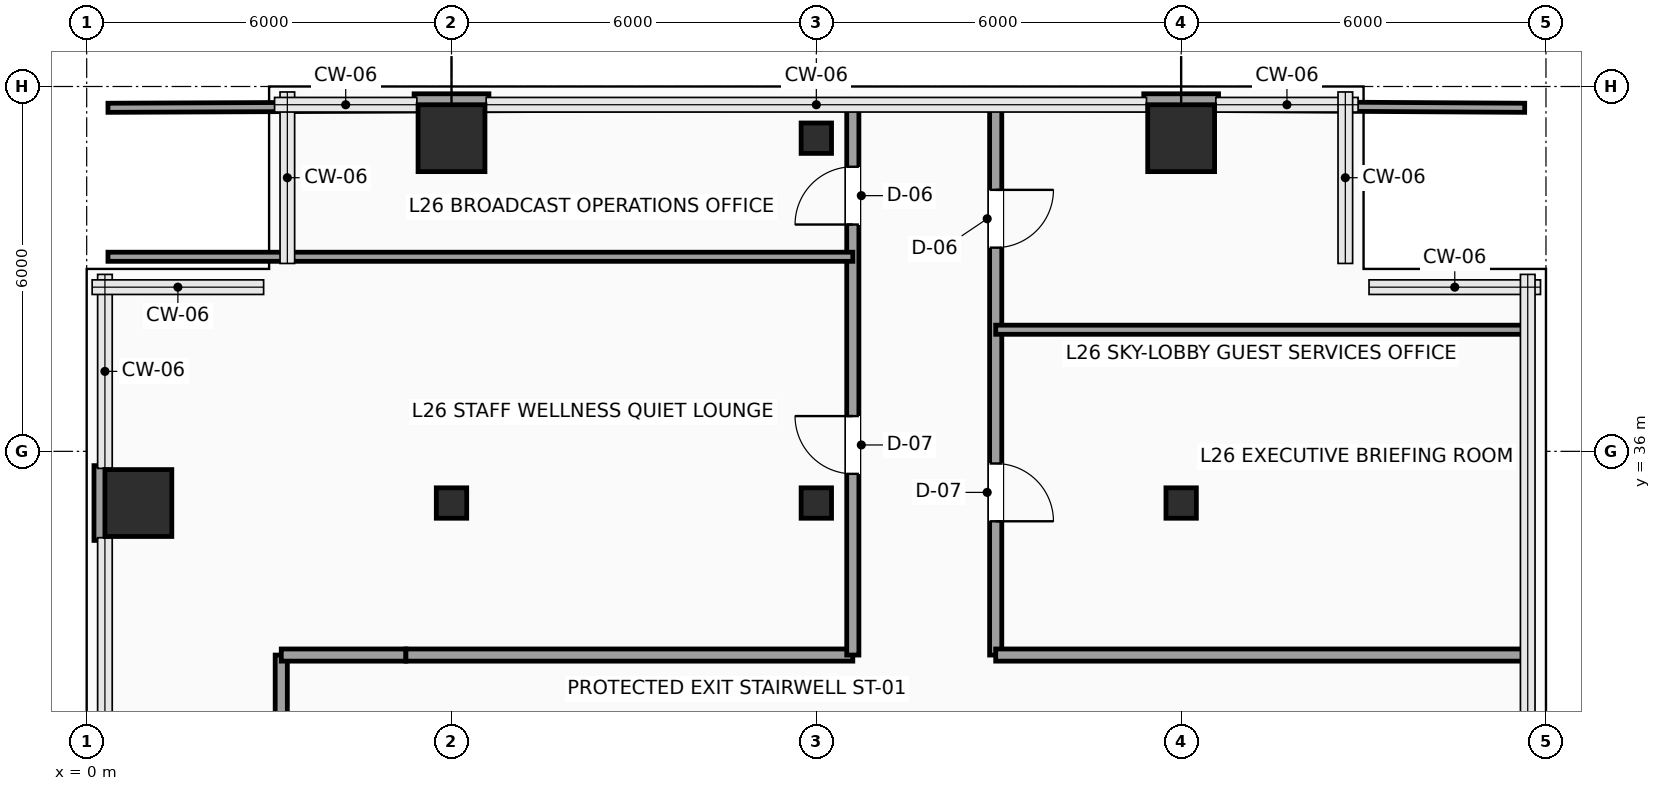
"""IFC4 building model, lengths in metres.
Left out: names, types, materials, properties, quantities, classifications, styles, units other than length and angle.
Written with IfcOpenShell. Run it as: python <this file> out.ifc"""

import sys

from ifc_helpers import new_model, si_unit, direction, frame, frame_2d, origin, origin_2d, place, context, subcontext, project, spatial, rectangle, hollow_rectangle, extrude, element, fill, save


model = new_model("IFC4")
c1 = context("Model", 3, precision=1e-05, world=origin(), true_north=direction((0.0, 1.0)))
c2 = subcontext(c1, "Body", "Model", "MODEL_VIEW")
j1 = project(units=[si_unit("LENGTHUNIT", "METRE"), si_unit("PLANEANGLEUNIT", "RADIAN")], contexts=[c1])
p1 = place(None, origin())
s1 = spatial("IfcSite", under=j1, at=p1, CompositionType="ELEMENT")
p2 = place(p1, origin())
s2 = spatial("IfcBuilding", under=s1, at=p2, CompositionType="ELEMENT")
p3 = place(p2, frame((0.0, 0.0, 110.85)))
s3 = spatial("IfcBuildingStorey", under=s2, at=p3, CompositionType="ELEMENT", Elevation=110.85)
p4 = place(p3, frame((0.85, 35.15, 0.0), z_axis=(0.0, 0.0, 1.0), x_axis=(1.0, 0.0, 0.0)))
e1 = element("IfcColumn", 1, at=p4, inside=s3, PredefinedType="COLUMN", context=c2, shape_type="SweptSolid", body=[
    extrude(rectangle(XDim=1.1, YDim=1.1, at=origin_2d()), origin(), (0.0, 0.0, 1.0), 4.8),
])
p5 = place(p3, frame((6.0, 35.15, 0.0), z_axis=(0.0, 0.0, 1.0), x_axis=(1.0, 0.0, 0.0)))
e2 = element("IfcColumn", 2, at=p5, inside=s3, PredefinedType="COLUMN", context=c2, shape_type="SweptSolid", body=[
    extrude(hollow_rectangle(XDim=0.5, YDim=0.5, WallThickness=0.025, InnerFilletRadius=0.025, OuterFilletRadius=0.04, at=origin_2d()), origin(), (0.0, 0.0, 1.0), 4.8),
])
p6 = place(p3, frame((6.0, 41.15, 0.0), z_axis=(0.0, 0.0, 1.0), x_axis=(1.0, 0.0, 0.0)))
e3 = element("IfcColumn", 3, at=p6, inside=s3, PredefinedType="COLUMN", context=c2, shape_type="SweptSolid", body=[
    extrude(rectangle(XDim=1.1, YDim=1.1, at=origin_2d()), origin(), (0.0, 0.0, 1.0), 4.8),
])
for number, where, z_axis, x_axis in (
    (4, (12.0, 35.15, 0.0), (0.0, 0.0, 1.0), (1.0, 0.0, 0.0)),
    (5, (12.0, 41.15, 0.0), (0.0, 0.0, 1.0), (1.0, 0.0, 0.0)),
    (6, (18.0, 35.15, 0.0), (0.0, 0.0, 1.0), (1.0, 0.0, 0.0)),
):
    element("IfcColumn", number, at=place(p3, frame(where, z_axis=z_axis, x_axis=x_axis)), inside=s3, PredefinedType="COLUMN", context=c2, shape_type="SweptSolid", body=[
        extrude(hollow_rectangle(XDim=0.5, YDim=0.5, WallThickness=0.025, InnerFilletRadius=0.025, OuterFilletRadius=0.04, at=origin_2d()), origin(), (0.0, 0.0, 1.0), 4.8),
    ])
p7 = place(p3, frame((18.0, 41.15, 0.0), z_axis=(0.0, 0.0, 1.0), x_axis=(1.0, 0.0, 0.0)))
e7 = element("IfcColumn", 7, at=p7, inside=s3, PredefinedType="COLUMN", context=c2, shape_type="SweptSolid", body=[
    extrude(rectangle(XDim=1.1, YDim=1.1, at=origin_2d()), origin(), (0.0, 0.0, 1.0), 4.8),
])
for number, where, z_axis, x_axis in (
    (8, (0.24, 34.535, 0.0), (0.0, 0.0, 1.0), (0.0, 1.0, 0.0)),
    (9, (5.385, 41.76, 0.0), (0.0, 0.0, 1.0), (1.0, 0.0, 0.0)),
    (10, (17.385, 41.76, 0.0), (0.0, 0.0, 1.0), (1.0, 0.0, 0.0)),
):
    element("IfcWall", number, at=place(p3, frame(where, z_axis=z_axis, x_axis=x_axis)), inside=s3, PredefinedType="SOLIDWALL", context=c2, shape_type="SweptSolid", body=[
        extrude(rectangle(XDim=1.23, YDim=0.24, at=frame_2d((0.615, 0.0))), origin(), (0.0, 0.0, 1.0), 4.575),
    ])
p8 = place(p3, frame((3.2, 30.25, 0.0), z_axis=(0.0, 0.0, 1.0), x_axis=(0.0, 1.0, 0.0)))
e11 = element("IfcWall", 11, at=p8, inside=s3, PredefinedType="PARTITIONING", context=c2, shape_type="SweptSolid", body=[
    extrude(rectangle(XDim=2.4, YDim=0.2, at=frame_2d((1.2, 0.0))), origin(), (0.0, 0.0, 1.0), 4.575),
])
p9 = place(p3, frame((3.2, 32.65, 0.0), z_axis=(0.0, 0.0, 1.0), x_axis=(1.0, 0.0, 0.0)))
e12 = element("IfcWall", 12, at=p9, inside=s3, PredefinedType="PARTITIONING", context=c2, shape_type="SweptSolid", body=[
    extrude(rectangle(XDim=2.05, YDim=0.2, at=frame_2d((1.025, 0.0))), origin(), (0.0, 0.0, 1.0), 4.575),
])
p10 = place(p3, frame((5.25, 32.65, 0.0), z_axis=(0.0, 0.0, 1.0), x_axis=(1.0, 0.0, 0.0)))
e13 = element("IfcWall", 13, at=p10, inside=s3, PredefinedType="PARTITIONING", context=c2, shape_type="SweptSolid", body=[
    extrude(rectangle(XDim=7.35, YDim=0.2, at=frame_2d((3.675, 0.0))), origin(), (0.0, 0.0, 1.0), 4.575),
])
p11 = place(p3, frame((12.6, 32.65, 0.0), z_axis=(0.0, 0.0, 1.0), x_axis=(0.0, 1.0, 0.0)))
e14 = element("IfcWall", 14, at=p11, inside=s3, PredefinedType="PARTITIONING", context=c2, shape_type="SweptSolid", body=[
    extrude(rectangle(XDim=9.05, YDim=0.2, at=frame_2d((4.525, 0.0))), origin(), (0.0, 0.0, 1.0), 4.575),
])
p12 = place(p11, frame((2.98, 0.0, 0.0)))
e15 = element("IfcOpeningElement", 15, at=p12, cuts=e14, PredefinedType="OPENING", context=c2, shape_type="SweptSolid", body=[
    extrude(rectangle(XDim=0.95, YDim=2.15, at=frame_2d((0.475, 1.075))), frame((0.0, 0.11, 0.0), z_axis=(0.0, -1.0, 0.0), x_axis=(1.0, 0.0, 0.0)), (0.0, 0.0, 1.0), 0.22),
])
p13 = place(p11, frame((7.08, 0.0, 0.0)))
e16 = element("IfcOpeningElement", 16, at=p13, cuts=e14, PredefinedType="OPENING", context=c2, shape_type="SweptSolid", body=[
    extrude(rectangle(XDim=0.95, YDim=2.15, at=frame_2d((0.475, 1.075))), frame((0.0, 0.11, 0.0), z_axis=(0.0, -1.0, 0.0), x_axis=(1.0, 0.0, 0.0)), (0.0, 0.0, 1.0), 0.22),
])
p14 = place(p3, frame((14.95, 41.7, 0.0), z_axis=(0.0, 0.0, 1.0), x_axis=(0.0, -1.0, 0.0)))
e17 = element("IfcWall", 17, at=p14, inside=s3, PredefinedType="PARTITIONING", context=c2, shape_type="SweptSolid", body=[
    extrude(rectangle(XDim=9.05, YDim=0.2, at=frame_2d((4.525, 0.0))), origin(), (0.0, 0.0, 1.0), 4.575),
])
p15 = place(p14, frame((5.9, 0.0, 0.0)))
e18 = element("IfcOpeningElement", 18, at=p15, cuts=e17, PredefinedType="OPENING", context=c2, shape_type="SweptSolid", body=[
    extrude(rectangle(XDim=0.95, YDim=2.15, at=frame_2d((0.475, 1.075))), frame((0.0, 0.11, 0.0), z_axis=(0.0, -1.0, 0.0), x_axis=(1.0, 0.0, 0.0)), (0.0, 0.0, 1.0), 0.22),
])
p16 = place(p14, frame((1.4, 0.0, 0.0)))
e19 = element("IfcOpeningElement", 19, at=p16, cuts=e17, PredefinedType="OPENING", context=c2, shape_type="SweptSolid", body=[
    extrude(rectangle(XDim=0.95, YDim=2.15, at=frame_2d((0.475, 1.075))), frame((0.0, 0.11, 0.0), z_axis=(0.0, -1.0, 0.0), x_axis=(1.0, 0.0, 0.0)), (0.0, 0.0, 1.0), 0.22),
])
p17 = place(p3, frame((14.95, 32.65, 0.0), z_axis=(0.0, 0.0, 1.0), x_axis=(1.0, 0.0, 0.0)))
e20 = element("IfcWall", 20, at=p17, inside=s3, PredefinedType="PARTITIONING", context=c2, shape_type="SweptSolid", body=[
    extrude(rectangle(XDim=8.75, YDim=0.2, at=frame_2d((4.375, 0.0))), origin(), (0.0, 0.0, 1.0), 4.575),
])
p18 = place(p3, frame((0.35, 39.2, 0.0), z_axis=(0.0, 0.0, 1.0), x_axis=(1.0, 0.0, 0.0)))
e21 = element("IfcWall", 21, at=p18, inside=s3, PredefinedType="PARTITIONING", context=c2, shape_type="SweptSolid", body=[
    extrude(rectangle(XDim=12.25, YDim=0.15, at=frame_2d((6.125, 0.0))), origin(), (0.0, 0.0, 1.0), 4.575),
])
p19 = place(p3, frame((0.35, 41.65, 0.0), z_axis=(0.0, 0.0, 1.0), x_axis=(0.999991506266, 0.004121576785, 0.0)))
e22 = element("IfcWall", 22, at=p19, inside=s3, PredefinedType="PARTITIONING", context=c2, shape_type="SweptSolid", body=[
    extrude(rectangle(XDim=5.035, YDim=0.15, at=frame_2d((2.518, 0.0))), origin(), (0.0, 0.0, 1.0), 4.575),
])
p20 = place(p3, frame((6.615, 41.676, 0.0), z_axis=(0.0, 0.0, 1.0), x_axis=(0.999991680432, 0.004079101287, 0.0)))
e23 = element("IfcWall", 23, at=p20, inside=s3, PredefinedType="PARTITIONING", context=c2, shape_type="SweptSolid", body=[
    extrude(rectangle(XDim=5.985, YDim=0.15, at=frame_2d((2.993, 0.0))), origin(), (0.0, 0.0, 1.0), 4.575),
])
p21 = place(p3, frame((14.95, 38.0, 0.0), z_axis=(0.0, 0.0, 1.0), x_axis=(1.0, 0.0, 0.0)))
e24 = element("IfcWall", 24, at=p21, inside=s3, PredefinedType="PARTITIONING", context=c2, shape_type="SweptSolid", body=[
    extrude(rectangle(XDim=8.75, YDim=0.15, at=frame_2d((4.375, 0.0))), origin(), (0.0, 0.0, 1.0), 4.117),
])
p22 = place(p3, frame((14.95, 41.7, 0.0), z_axis=(0.0, 0.0, 1.0), x_axis=(0.999983670595, -0.005714765312, 0.0)))
e25 = element("IfcWall", 25, at=p22, inside=s3, PredefinedType="PARTITIONING", context=c2, shape_type="SweptSolid", body=[
    extrude(rectangle(XDim=2.435, YDim=0.15, at=frame_2d((1.218, 0.0))), origin(), (0.0, 0.0, 1.0), 4.575),
])
p23 = place(p3, frame((18.615, 41.679, 0.0), z_axis=(0.0, 0.0, 1.0), x_axis=(0.999983352486, -0.005770160449, 0.0)))
e26 = element("IfcWall", 26, at=p23, inside=s3, PredefinedType="PARTITIONING", context=c2, shape_type="SweptSolid", body=[
    extrude(rectangle(XDim=5.035, YDim=0.15, at=frame_2d((2.518, 0.0))), origin(), (0.0, 0.0, 1.0), 4.575),
])
p24 = place(p12, origin())
e27 = element("IfcDoor", 27, at=p24, inside=s3, OperationType="SINGLE_SWING_RIGHT", PredefinedType="DOOR", context=c2, shape_type="SweptSolid", body=[
    extrude(rectangle(XDim=0.95, YDim=2.15, at=frame_2d((0.475, 1.075))), frame((0.0, 0.025, 0.0), z_axis=(0.0, -1.0, 0.0), x_axis=(1.0, 0.0, 0.0)), (0.0, 0.0, 1.0), 0.05),
])
fill(e15, e27)
p25 = place(p13, origin())
e28 = element("IfcDoor", 28, at=p25, inside=s3, OperationType="SINGLE_SWING_LEFT", PredefinedType="DOOR", context=c2, shape_type="SweptSolid", body=[
    extrude(rectangle(XDim=0.95, YDim=2.15, at=frame_2d((0.475, 1.075))), frame((0.0, 0.025, 0.0), z_axis=(0.0, -1.0, 0.0), x_axis=(1.0, 0.0, 0.0)), (0.0, 0.0, 1.0), 0.05),
])
fill(e16, e28)
p26 = place(p15, origin())
e29 = element("IfcDoor", 29, at=p26, inside=s3, OperationType="SINGLE_SWING_RIGHT", PredefinedType="DOOR", context=c2, shape_type="SweptSolid", body=[
    extrude(rectangle(XDim=0.95, YDim=2.15, at=frame_2d((0.475, 1.075))), frame((0.0, 0.025, 0.0), z_axis=(0.0, -1.0, 0.0), x_axis=(1.0, 0.0, 0.0)), (0.0, 0.0, 1.0), 0.05),
])
fill(e18, e29)
p27 = place(p16, origin())
e30 = element("IfcDoor", 30, at=p27, inside=s3, OperationType="SINGLE_SWING_LEFT", PredefinedType="DOOR", context=c2, shape_type="SweptSolid", body=[
    extrude(rectangle(XDim=0.95, YDim=2.15, at=frame_2d((0.475, 1.075))), frame((0.0, 0.025, 0.0), z_axis=(0.0, -1.0, 0.0), x_axis=(1.0, 0.0, 0.0)), (0.0, 0.0, 1.0), 0.05),
])
fill(e19, e30)
save(model, sys.argv[1])
